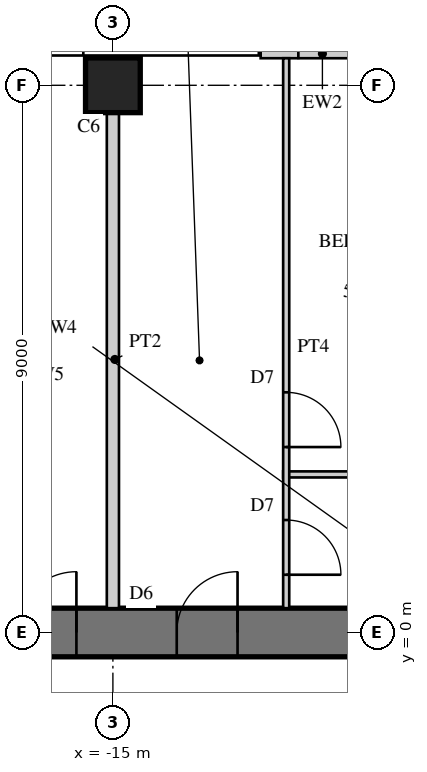
"""IFC4 building model, lengths in metres.
Left out: names, types, materials, properties, quantities, classifications, styles, units other than length and angle.
Written with IfcOpenShell. Run it as: python <this file> out.ifc"""

import sys

from ifc_helpers import new_model, si_unit, direction, frame, frame_2d, origin, origin_2d, place, context, subcontext, project, spatial, rectangle, extrude, element, fill, save


model = new_model("IFC4")
c1 = context("Model", 3, precision=1e-05, world=origin(), true_north=direction((0.0, 1.0)))
c2 = subcontext(c1, "Body", "Model", "MODEL_VIEW")
j1 = project(units=[si_unit("LENGTHUNIT", "METRE"), si_unit("PLANEANGLEUNIT", "RADIAN")], contexts=[c1])
p1 = place(None, origin())
s1 = spatial("IfcSite", under=j1, at=p1, CompositionType="ELEMENT")
p2 = place(p1, origin())
s2 = spatial("IfcBuilding", under=s1, at=p2, CompositionType="ELEMENT")
p3 = place(p2, frame((0.0, 0.0, 200.1)))
s3 = spatial("IfcBuildingStorey", under=s2, at=p3, CompositionType="ELEMENT", Elevation=200.1)
p4 = place(p3, frame((-9.0, 0.0, 0.0), z_axis=(0.0, 0.0, 1.0), x_axis=(-1.0, 0.0, 0.0)))
e1 = element("IfcWall", 1, at=p4, inside=s3, PredefinedType="SHEAR", context=c2, shape_type="SweptSolid", body=[
    extrude(rectangle(XDim=18.0, YDim=0.8, at=frame_2d((9.0, 0.0))), origin(), (0.0, 0.0, 1.0), 3.4),
])
p5 = place(p4, frame((3.95, 0.0, 0.0)))
e2 = element("IfcOpeningElement", 2, at=p5, cuts=e1, PredefinedType="OPENING", context=c2, shape_type="SweptSolid", body=[
    extrude(rectangle(XDim=1.0, YDim=2.15, at=frame_2d((0.5, 1.075))), frame((0.0, 0.41, 0.0), z_axis=(0.0, -1.0, 0.0), x_axis=(1.0, 0.0, 0.0)), (0.0, 0.0, 1.0), 0.82),
])
p6 = place(p4, frame((6.6, 0.0, 0.0)))
e3 = element("IfcOpeningElement", 3, at=p6, cuts=e1, PredefinedType="OPENING", context=c2, shape_type="SweptSolid", body=[
    extrude(rectangle(XDim=1.0, YDim=2.15, at=frame_2d((0.5, 1.075))), frame((0.0, 0.41, 0.0), z_axis=(0.0, -1.0, 0.0), x_axis=(1.0, 0.0, 0.0)), (0.0, 0.0, 1.0), 0.82),
])
p7 = place(p4, frame((13.25, 0.0, 0.0)))
e4 = element("IfcOpeningElement", 4, at=p7, cuts=e1, PredefinedType="OPENING", context=c2, shape_type="SweptSolid", body=[
    extrude(rectangle(XDim=1.0, YDim=2.2, at=frame_2d((0.5, 1.1))), frame((0.0, 0.41, 0.0), z_axis=(0.0, -1.0, 0.0), x_axis=(1.0, 0.0, 0.0)), (0.0, 0.0, 1.0), 0.82),
])
p8 = place(p3, frame((-15.0, 9.0, 0.0), z_axis=(0.0, 0.0, 1.0), x_axis=(1.0, 0.0, 0.0)))
e5 = element("IfcColumn", 5, at=p8, inside=s3, PredefinedType="COLUMN", context=c2, shape_type="SweptSolid", body=[
    extrude(rectangle(XDim=0.9, YDim=0.9, at=origin_2d()), origin(), (0.0, 0.0, 1.0), 3.4),
])
p9 = place(p3, frame((-9.445, 9.57, 0.0), z_axis=(0.0, 0.0, 1.0), x_axis=(-1.0, 0.0, 0.0)))
e6 = element("IfcWall", 6, at=p9, inside=s3, PredefinedType="SOLIDWALL", context=c2, shape_type="SweptSolid", body=[
    extrude(rectangle(XDim=3.125, YDim=0.25, at=frame_2d((1.562, 0.0))), origin(), (0.0, 0.0, 1.0), 3.22),
])
p10 = place(p9, frame((0.6, 0.0, 0.0)))
e7 = element("IfcOpeningElement", 7, at=p10, cuts=e6, PredefinedType="OPENING", context=c2, shape_type="SweptSolid", body=[
    extrude(rectangle(XDim=1.0, YDim=2.2, at=frame_2d((0.5, 1.1))), frame((0.0, 0.135, 0.0), z_axis=(0.0, -1.0, 0.0), x_axis=(1.0, 0.0, 0.0)), (0.0, 0.0, 1.0), 0.27),
])
p11 = place(p3, frame((-9.55, 2.6, 0.0), z_axis=(0.0, 0.0, 1.0), x_axis=(-1.0, 0.0, 0.0)))
e8 = element("IfcWall", 8, at=p11, inside=s3, PredefinedType="PARTITIONING", context=c2, shape_type="SweptSolid", body=[
    extrude(rectangle(XDim=2.65, YDim=0.1, at=frame_2d((1.325, 0.0))), origin(), (0.0, 0.0, 1.0), 3.22),
])
p12 = place(p3, frame((-12.15, 9.445, 0.0), z_axis=(0.0, 0.0, 1.0), x_axis=(0.0, -1.0, 0.0)))
e9 = element("IfcWall", 9, at=p12, inside=s3, PredefinedType="PARTITIONING", context=c2, shape_type="SweptSolid", body=[
    extrude(rectangle(XDim=9.045, YDim=0.1, at=frame_2d((4.522, 0.0))), origin(), (0.0, 0.0, 1.0), 3.22),
])
p13 = place(p12, frame((5.495, 0.0, 0.0)))
e10 = element("IfcOpeningElement", 10, at=p13, cuts=e9, PredefinedType="OPENING", context=c2, shape_type="SweptSolid", body=[
    extrude(rectangle(XDim=0.9, YDim=2.1, at=frame_2d((0.45, 1.05))), frame((0.0, 0.06, 0.0), z_axis=(0.0, -1.0, 0.0), x_axis=(1.0, 0.0, 0.0)), (0.0, 0.0, 1.0), 0.12),
])
p14 = place(p12, frame((7.595, 0.0, 0.0)))
e11 = element("IfcOpeningElement", 11, at=p14, cuts=e9, PredefinedType="OPENING", context=c2, shape_type="SweptSolid", body=[
    extrude(rectangle(XDim=0.9, YDim=2.1, at=frame_2d((0.45, 1.05))), frame((0.0, 0.06, 0.0), z_axis=(0.0, -1.0, 0.0), x_axis=(1.0, 0.0, 0.0)), (0.0, 0.0, 1.0), 0.12),
])
p15 = place(p3, frame((-15.0, 8.55, 0.0), z_axis=(0.0, 0.0, 1.0), x_axis=(0.0, -1.0, 0.0)))
e12 = element("IfcWall", 12, at=p15, inside=s3, PredefinedType="SOLIDWALL", context=c2, shape_type="SweptSolid", body=[
    extrude(rectangle(XDim=8.15, YDim=0.2, at=frame_2d((4.075, 0.0))), origin(), (0.0, 0.0, 1.0), 2.47),
])
p16 = place(p13, origin())
e13 = element("IfcDoor", 13, at=p16, inside=s3, OperationType="SINGLE_SWING_RIGHT", PredefinedType="DOOR", context=c2, shape_type="SweptSolid", body=[
    extrude(rectangle(XDim=0.9, YDim=2.1, at=frame_2d((0.45, 1.05))), frame((0.0, 0.025, 0.0), z_axis=(0.0, -1.0, 0.0), x_axis=(1.0, 0.0, 0.0)), (0.0, 0.0, 1.0), 0.05),
])
fill(e10, e13)
p17 = place(p14, origin())
e14 = element("IfcDoor", 14, at=p17, inside=s3, OperationType="SINGLE_SWING_RIGHT", PredefinedType="DOOR", context=c2, shape_type="SweptSolid", body=[
    extrude(rectangle(XDim=0.9, YDim=2.1, at=frame_2d((0.45, 1.05))), frame((0.0, 0.025, 0.0), z_axis=(0.0, -1.0, 0.0), x_axis=(1.0, 0.0, 0.0)), (0.0, 0.0, 1.0), 0.05),
])
fill(e11, e14)
p18 = place(p5, frame((1.0, 0.0, 0.0), z_axis=(0.0, 0.0, 1.0), x_axis=(-1.0, 0.0, 0.0)))
e15 = element("IfcDoor", 15, at=p18, inside=s3, OperationType="SINGLE_SWING_RIGHT", PredefinedType="DOOR", context=c2, shape_type="SweptSolid", body=[
    extrude(rectangle(XDim=1.0, YDim=2.15, at=frame_2d((0.5, 1.075))), frame((0.0, 0.025, 0.0), z_axis=(0.0, -1.0, 0.0), x_axis=(1.0, 0.0, 0.0)), (0.0, 0.0, 1.0), 0.05),
])
fill(e2, e15)
p19 = place(p6, frame((1.0, 0.0, 0.0), z_axis=(0.0, 0.0, 1.0), x_axis=(-1.0, 0.0, 0.0)))
e16 = element("IfcDoor", 16, at=p19, inside=s3, OperationType="SINGLE_SWING_RIGHT", PredefinedType="DOOR", context=c2, shape_type="SweptSolid", body=[
    extrude(rectangle(XDim=1.0, YDim=2.15, at=frame_2d((0.5, 1.075))), frame((0.0, 0.025, 0.0), z_axis=(0.0, -1.0, 0.0), x_axis=(1.0, 0.0, 0.0)), (0.0, 0.0, 1.0), 0.05),
])
fill(e3, e16)
save(model, sys.argv[1])
